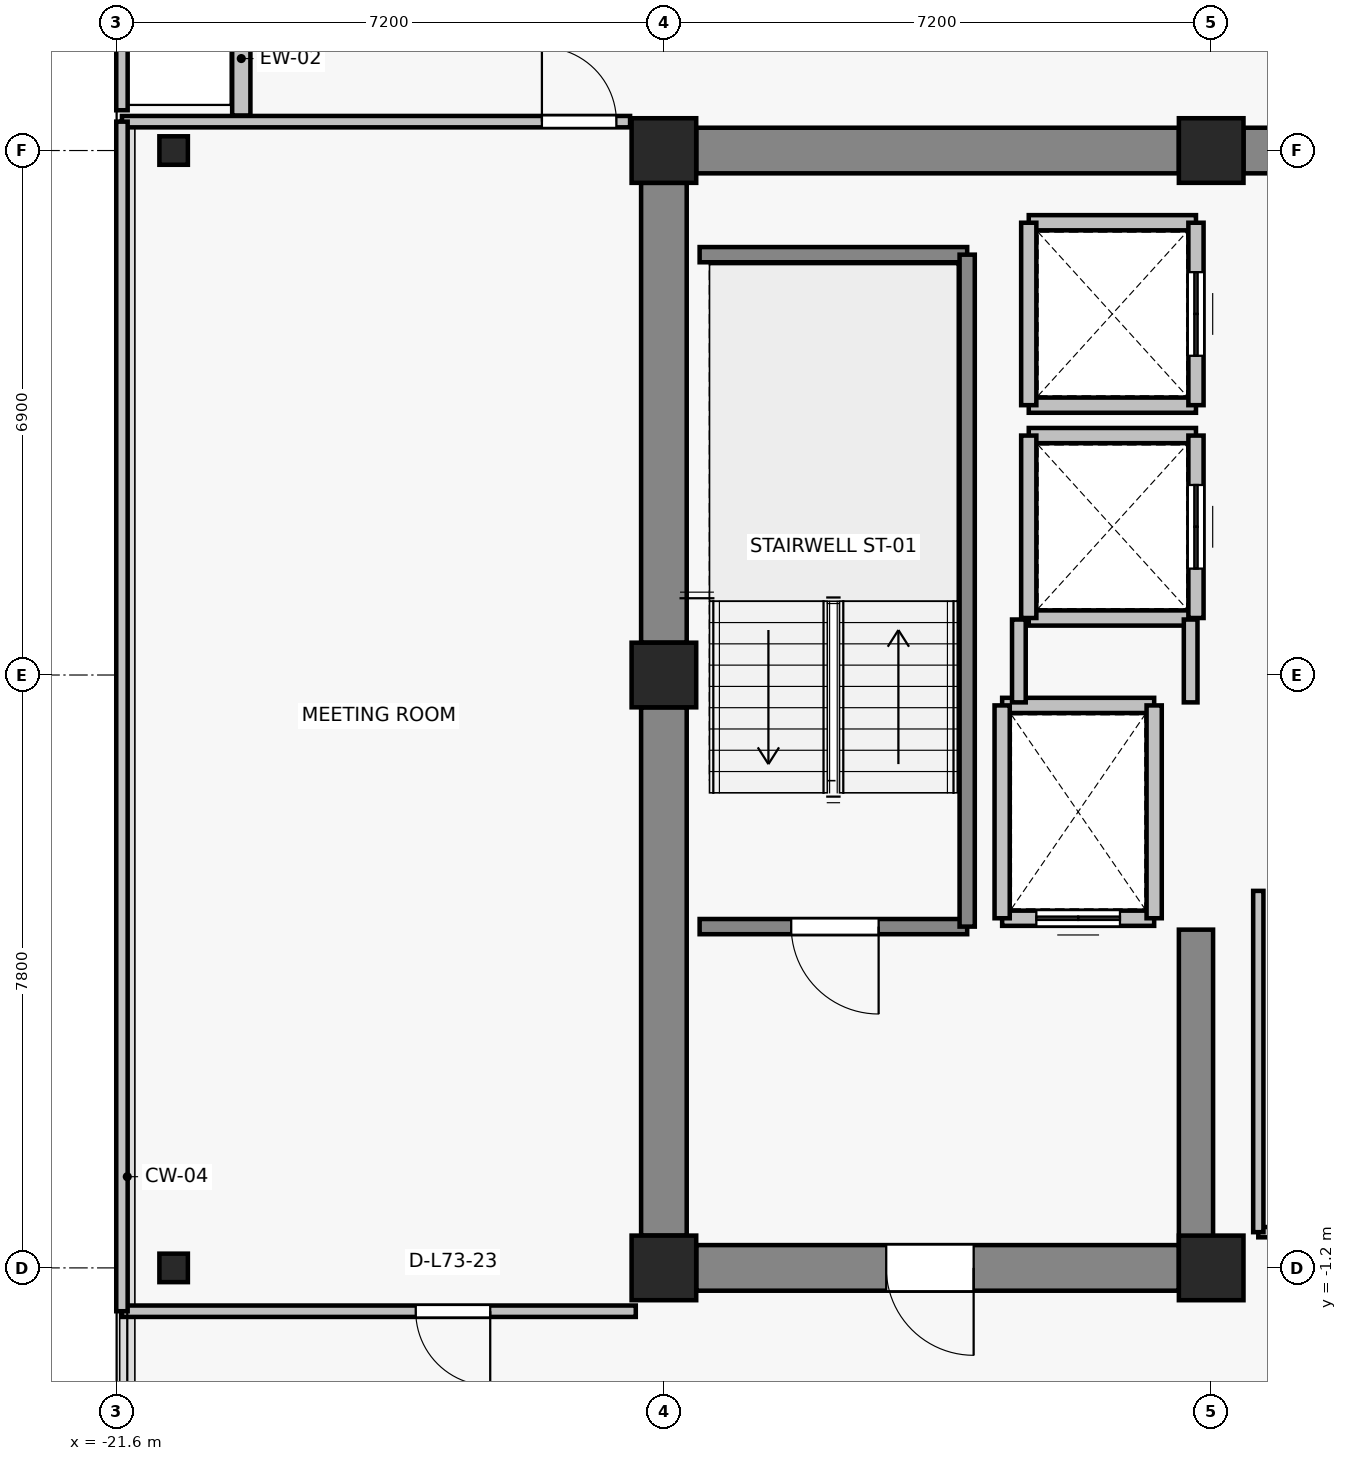
"""IFC4 building model, lengths in metres.
Left out: names, types, materials, properties, quantities, classifications, styles, units other than length and angle.
Written with IfcOpenShell. Run it as: python <this file> out.ifc"""

import sys

from ifc_helpers import new_model, si_unit, direction, frame, frame_2d, origin, origin_2d, place, context, subcontext, project, spatial, rectangle, i_section, extrude, source, transform, mapped, element, fill, save


model = new_model("IFC4")
c1 = context("Model", 3, precision=1e-05, world=origin(), true_north=direction((0.0, 1.0)))
c2 = subcontext(c1, "Body", "Model", "MODEL_VIEW")
j1 = project(units=[si_unit("LENGTHUNIT", "METRE"), si_unit("PLANEANGLEUNIT", "RADIAN")], contexts=[c1])
p1 = place(None, origin())
s1 = spatial("IfcSite", under=j1, at=p1, CompositionType="ELEMENT")
p2 = place(p1, origin())
s2 = spatial("IfcBuilding", under=s1, at=p2, CompositionType="ELEMENT")
p3 = place(p2, frame((0.0, 0.0, 258.4)))
s3 = spatial("IfcBuildingStorey", under=s2, at=p3, CompositionType="ELEMENT", Elevation=258.4)
for number, where, z_axis, x_axis in (
    (1, (-14.4, -1.2, 0.0), (0.0, 0.0, 1.0), (1.0, 0.0, 0.0)),
    (2, (-7.2, -1.2, 0.0), (0.0, 0.0, 1.0), (1.0, 0.0, 0.0)),
    (3, (-14.4, 6.6, 0.0), (0.0, 0.0, 1.0), (1.0, 0.0, 0.0)),
    (4, (-14.4, 13.5, 0.0), (0.0, 0.0, 1.0), (1.0, 0.0, 0.0)),
    (5, (-7.2, 13.5, 0.0), (0.0, 0.0, 1.0), (1.0, 0.0, 0.0)),
):
    element("IfcColumn", number, at=place(p3, frame(where, z_axis=z_axis, x_axis=x_axis)), inside=s3, PredefinedType="COLUMN", context=c2, shape_type="SweptSolid", body=[
        extrude(rectangle(XDim=0.85, YDim=0.85, at=origin_2d()), origin(), (0.0, 0.0, 1.0), 3.3),
    ])
for number, where, z_axis, x_axis in (
    (6, (-20.85, -1.2, 0.0), (0.0, 0.0, 1.0), (1.0, 0.0, 0.0)),
    (7, (-20.85, 13.5, 0.0), (0.0, 0.0, 1.0), (1.0, 0.0, 0.0)),
):
    element("IfcColumn", number, at=place(p3, frame(where, z_axis=z_axis, x_axis=x_axis)), inside=s3, PredefinedType="COLUMN", context=c2, shape_type="SweptSolid", body=[
        extrude(i_section(OverallWidth=0.375, OverallDepth=0.375, WebThickness=0.017, FlangeThickness=0.027, FilletRadius=0.015, at=origin_2d()), origin(), (0.0, 0.0, 1.0), 3.3),
    ])
p4 = place(p3, frame((-13.975, 13.5, 0.0), z_axis=(0.0, 0.0, 1.0), x_axis=(1.0, 0.0, 0.0)))
e8 = element("IfcWall", 8, at=p4, inside=s3, PredefinedType="SHEAR", context=c2, shape_type="SweptSolid", body=[
    extrude(rectangle(XDim=6.35, YDim=0.6, at=frame_2d((3.175, 0.0))), origin(), (0.0, 0.0, 1.0), 3.075),
])
p5 = place(p3, frame((-6.775, 13.5, 0.0), z_axis=(0.0, 0.0, 1.0), x_axis=(1.0, 0.0, 0.0)))
e9 = element("IfcWall", 9, at=p5, inside=s3, PredefinedType="SHEAR", context=c2, shape_type="SweptSolid", body=[
    extrude(rectangle(XDim=13.55, YDim=0.6, at=frame_2d((6.775, 0.0))), origin(), (0.0, 0.0, 1.0), 3.075),
])
p6 = place(p3, frame((-14.4, -0.775, 0.0), z_axis=(0.0, 0.0, 1.0), x_axis=(0.0, 1.0, 0.0)))
e10 = element("IfcWall", 10, at=p6, inside=s3, PredefinedType="SHEAR", context=c2, shape_type="SweptSolid", body=[
    extrude(rectangle(XDim=6.95, YDim=0.6, at=frame_2d((3.475, 0.0))), origin(), (0.0, 0.0, 1.0), 3.075),
])
p7 = place(p3, frame((-14.4, 7.025, 0.0), z_axis=(0.0, 0.0, 1.0), x_axis=(0.0, 1.0, 0.0)))
e11 = element("IfcWall", 11, at=p7, inside=s3, PredefinedType="SHEAR", context=c2, shape_type="SweptSolid", body=[
    extrude(rectangle(XDim=6.05, YDim=0.6, at=frame_2d((3.025, 0.0))), origin(), (0.0, 0.0, 1.0), 3.075),
])
p8 = place(p3, frame((-7.625, -1.2, 0.0), z_axis=(0.0, 0.0, 1.0), x_axis=(-1.0, 0.0, 0.0)))
e12 = element("IfcWall", 12, at=p8, inside=s3, PredefinedType="SHEAR", context=c2, shape_type="SweptSolid", body=[
    extrude(rectangle(XDim=6.35, YDim=0.6, at=frame_2d((3.175, 0.0))), origin(), (0.0, 0.0, 1.0), 3.075),
])
p9 = place(p8, frame((2.7, 0.0, 0.0)))
e13 = element("IfcOpeningElement", 13, at=p9, cuts=e12, PredefinedType="OPENING", context=c2, shape_type="SweptSolid", body=[
    extrude(rectangle(XDim=1.15, YDim=2.15, at=frame_2d((0.575, 1.075))), frame((0.0, 0.31, 0.0), z_axis=(0.0, -1.0, 0.0), x_axis=(1.0, 0.0, 0.0)), (0.0, 0.0, 1.0), 0.62),
])
p10 = place(p3, frame((-7.4, -0.9, 0.0), z_axis=(0.0, 0.0, 1.0), x_axis=(0.0, 1.0, 0.0)))
e14 = element("IfcWall", 14, at=p10, inside=s3, PredefinedType="SHEAR", context=c2, shape_type="SweptSolid", body=[
    extrude(rectangle(XDim=4.15, YDim=0.45, at=frame_2d((2.075, 0.0))), origin(), (0.0, 0.0, 1.0), 3.075),
])
p11 = place(p3, frame((-19.96, 15.46, 0.0), z_axis=(0.0, 0.0, 1.0), x_axis=(0.0, -1.0, 0.0)))
e15 = element("IfcWall", 15, at=p11, inside=s3, PredefinedType="SOLIDWALL", context=c2, shape_type="SweptSolid", body=[
    extrude(rectangle(XDim=1.5, YDim=0.24, at=frame_2d((0.75, 0.0))), origin(), (0.0, 0.0, 1.0), 3.075),
])
p12 = place(p3, frame((-7.95, 3.4, 0.0), z_axis=(0.0, 0.0, 1.0), x_axis=(-1.0, 0.0, 0.0)))
e16 = element("IfcWall", 16, at=p12, inside=s3, PredefinedType="SOLIDWALL", context=c2, shape_type="SweptSolid", body=[
    extrude(rectangle(XDim=2.0, YDim=0.2, at=frame_2d((1.0, 0.0))), origin(), (0.0, 0.0, 1.0), 3.075),
])
p13 = place(p12, frame((0.45, 0.0, 0.0)))
e17 = element("IfcOpeningElement", 17, at=p13, cuts=e16, PredefinedType="OPENING", context=c2, shape_type="SweptSolid", body=[
    extrude(rectangle(XDim=1.1, YDim=2.2, at=frame_2d((0.55, 1.1))), frame((0.0, 0.11, 0.0), z_axis=(0.0, -1.0, 0.0), x_axis=(1.0, 0.0, 0.0)), (0.0, 0.0, 1.0), 0.22),
])
p14 = place(p3, frame((-9.95, 6.2, 0.0), z_axis=(0.0, 0.0, 1.0), x_axis=(1.0, 0.0, 0.0)))
e18 = element("IfcWall", 18, at=p14, inside=s3, PredefinedType="SOLIDWALL", context=c2, shape_type="SweptSolid", body=[
    extrude(rectangle(XDim=2.0, YDim=0.2, at=frame_2d((1.0, 0.0))), origin(), (0.0, 0.0, 1.0), 3.075),
])
for number, where, z_axis, x_axis in (
    (19, (-9.95, 3.4, 0.0), (0.0, 0.0, 1.0), (0.0, 1.0, 0.0)),
    (20, (-7.95, 6.2, 0.0), (0.0, 0.0, 1.0), (0.0, -1.0, 0.0)),
):
    element("IfcWall", number, at=place(p3, frame(where, z_axis=z_axis, x_axis=x_axis)), inside=s3, PredefinedType="SOLIDWALL", context=c2, shape_type="SweptSolid", body=[
        extrude(rectangle(XDim=2.8, YDim=0.2, at=frame_2d((1.4, 0.0))), origin(), (0.0, 0.0, 1.0), 3.075),
    ])
for number, where, z_axis, x_axis in (
    (21, (-7.4, 7.35, 0.0), (0.0, 0.0, 1.0), (-1.0, 0.0, 0.0)),
    (22, (-9.6, 9.75, 0.0), (0.0, 0.0, 1.0), (1.0, 0.0, 0.0)),
):
    element("IfcWall", number, at=place(p3, frame(where, z_axis=z_axis, x_axis=x_axis)), inside=s3, PredefinedType="SOLIDWALL", context=c2, shape_type="SweptSolid", body=[
        extrude(rectangle(XDim=2.2, YDim=0.2, at=frame_2d((1.1, 0.0))), origin(), (0.0, 0.0, 1.0), 2.615),
    ])
p15 = place(p3, frame((-9.6, 7.35, 0.0), z_axis=(0.0, 0.0, 1.0), x_axis=(0.0, 1.0, 0.0)))
e23 = element("IfcWall", 23, at=p15, inside=s3, PredefinedType="SOLIDWALL", context=c2, shape_type="SweptSolid", body=[
    extrude(rectangle(XDim=2.4, YDim=0.2, at=frame_2d((1.2, 0.0))), origin(), (0.0, 0.0, 1.0), 3.075),
])
p16 = place(p3, frame((-7.4, 9.75, 0.0), z_axis=(0.0, 0.0, 1.0), x_axis=(0.0, -1.0, 0.0)))
e24 = element("IfcWall", 24, at=p16, inside=s3, PredefinedType="SOLIDWALL", context=c2, shape_type="SweptSolid", body=[
    extrude(rectangle(XDim=2.4, YDim=0.2, at=frame_2d((1.2, 0.0))), origin(), (0.0, 0.0, 1.0), 2.615),
])
p17 = place(p16, frame((0.65, 0.0, 0.0)))
e25 = element("IfcOpeningElement", 25, at=p17, cuts=e24, PredefinedType="OPENING", context=c2, shape_type="SweptSolid", body=[
    extrude(rectangle(XDim=1.1, YDim=2.2, at=frame_2d((0.55, 1.1))), frame((0.0, 0.11, 0.0), z_axis=(0.0, -1.0, 0.0), x_axis=(1.0, 0.0, 0.0)), (0.0, 0.0, 1.0), 0.22),
])
for number, where, z_axis, x_axis in (
    (26, (-7.4, 10.15, 0.0), (0.0, 0.0, 1.0), (-1.0, 0.0, 0.0)),
    (27, (-9.6, 12.55, 0.0), (0.0, 0.0, 1.0), (1.0, 0.0, 0.0)),
):
    element("IfcWall", number, at=place(p3, frame(where, z_axis=z_axis, x_axis=x_axis)), inside=s3, PredefinedType="SOLIDWALL", context=c2, shape_type="SweptSolid", body=[
        extrude(rectangle(XDim=2.2, YDim=0.2, at=frame_2d((1.1, 0.0))), origin(), (0.0, 0.0, 1.0), 2.615),
    ])
p18 = place(p3, frame((-9.6, 10.15, 0.0), z_axis=(0.0, 0.0, 1.0), x_axis=(0.0, 1.0, 0.0)))
e28 = element("IfcWall", 28, at=p18, inside=s3, PredefinedType="SOLIDWALL", context=c2, shape_type="SweptSolid", body=[
    extrude(rectangle(XDim=2.4, YDim=0.2, at=frame_2d((1.2, 0.0))), origin(), (0.0, 0.0, 1.0), 3.075),
])
p19 = place(p3, frame((-7.4, 12.55, 0.0), z_axis=(0.0, 0.0, 1.0), x_axis=(0.0, -1.0, 0.0)))
e29 = element("IfcWall", 29, at=p19, inside=s3, PredefinedType="SOLIDWALL", context=c2, shape_type="SweptSolid", body=[
    extrude(rectangle(XDim=2.4, YDim=0.2, at=frame_2d((1.2, 0.0))), origin(), (0.0, 0.0, 1.0), 2.615),
])
p20 = place(p19, frame((0.65, 0.0, 0.0)))
e30 = element("IfcOpeningElement", 30, at=p20, cuts=e29, PredefinedType="OPENING", context=c2, shape_type="SweptSolid", body=[
    extrude(rectangle(XDim=1.1, YDim=2.2, at=frame_2d((0.55, 1.1))), frame((0.0, 0.11, 0.0), z_axis=(0.0, -1.0, 0.0), x_axis=(1.0, 0.0, 0.0)), (0.0, 0.0, 1.0), 0.22),
])
p21 = place(p3, frame((-10.41, 3.29, 0.0), z_axis=(0.0, 0.0, 1.0), x_axis=(-1.0, 0.0, 0.0)))
e31 = element("IfcWall", 31, at=p21, inside=s3, PredefinedType="SOLIDWALL", context=c2, shape_type="SweptSolid", body=[
    extrude(rectangle(XDim=3.52, YDim=0.2, at=frame_2d((1.76, 0.0))), origin(), (0.0, 0.0, 1.0), 3.075),
])
p22 = place(p21, frame((1.165, 0.0, 0.0)))
e32 = element("IfcOpeningElement", 32, at=p22, cuts=e31, PredefinedType="OPENING", context=c2, shape_type="SweptSolid", body=[
    extrude(rectangle(XDim=1.15, YDim=2.15, at=frame_2d((0.575, 1.075))), frame((0.0, 0.11, 0.0), z_axis=(0.0, -1.0, 0.0), x_axis=(1.0, 0.0, 0.0)), (0.0, 0.0, 1.0), 0.22),
])
p23 = place(p3, frame((-13.93, 12.13, 0.0), z_axis=(0.0, 0.0, 1.0), x_axis=(1.0, 0.0, 0.0)))
e33 = element("IfcWall", 33, at=p23, inside=s3, PredefinedType="SOLIDWALL", context=c2, shape_type="SweptSolid", body=[
    extrude(rectangle(XDim=3.52, YDim=0.2, at=frame_2d((1.76, 0.0))), origin(), (0.0, 0.0, 1.0), 3.075),
])
p24 = place(p3, frame((-10.41, 12.13, 0.0), z_axis=(0.0, 0.0, 1.0), x_axis=(0.0, -1.0, 0.0)))
e34 = element("IfcWall", 34, at=p24, inside=s3, PredefinedType="SOLIDWALL", context=c2, shape_type="SweptSolid", body=[
    extrude(rectangle(XDim=8.84, YDim=0.2, at=frame_2d((4.42, 0.0))), origin(), (0.0, 0.0, 1.0), 3.075),
])
p25 = place(p3, frame((-9.73, 6.24, 0.0), z_axis=(0.0, 0.0, 1.0), x_axis=(0.0, 1.0, 0.0)))
e35 = element("IfcWall", 35, at=p25, inside=s3, PredefinedType="PARTITIONING", context=c2, shape_type="SweptSolid", body=[
    extrude(rectangle(XDim=1.09, YDim=0.18, at=frame_2d((0.545, 0.0))), origin(), (0.0, 0.0, 1.0), 3.075),
])
p26 = place(p3, frame((-7.47, 7.33, 0.0), z_axis=(0.0, 0.0, 1.0), x_axis=(0.0, -1.0, 0.0)))
e36 = element("IfcWall", 36, at=p26, inside=s3, PredefinedType="PARTITIONING", context=c2, shape_type="SweptSolid", body=[
    extrude(rectangle(XDim=1.09, YDim=0.18, at=frame_2d((0.545, 0.0))), origin(), (0.0, 0.0, 1.0), 2.615),
])
p27 = place(p3, frame((-3.47, -0.73, 0.0), z_axis=(0.0, 0.0, 1.0), x_axis=(-1.0, 0.0, 0.0)))
e37 = element("IfcWall", 37, at=p27, inside=s3, PredefinedType="PARTITIONING", context=c2, shape_type="SweptSolid", body=[
    extrude(rectangle(XDim=3.11, YDim=0.135, at=frame_2d((1.555, 0.0))), origin(), (0.0, 0.0, 1.0), 3.075),
])
p28 = place(p27, frame((1.09, 0.0, 0.0)))
e38 = element("IfcOpeningElement", 38, at=p28, cuts=e37, PredefinedType="OPENING", context=c2, shape_type="SweptSolid", body=[
    extrude(rectangle(XDim=0.92, YDim=2.1, at=frame_2d((0.46, 1.05))), frame((0.0, 0.077, 0.0), z_axis=(0.0, -1.0, 0.0), x_axis=(1.0, 0.0, 0.0)), (0.0, 0.0, 1.0), 0.155),
])
p29 = place(p3, frame((-6.58, -0.73, 0.0), z_axis=(0.0, 0.0, 1.0), x_axis=(0.0, 1.0, 0.0)))
e39 = element("IfcWall", 39, at=p29, inside=s3, PredefinedType="PARTITIONING", context=c2, shape_type="SweptSolid", body=[
    extrude(rectangle(XDim=4.49, YDim=0.135, at=frame_2d((2.245, 0.0))), origin(), (0.0, 0.0, 1.0), 3.075),
])
p30 = place(p3, frame((-14.77, -1.77, 0.0), z_axis=(0.0, 0.0, 1.0), x_axis=(-1.0, 0.0, 0.0)))
e40 = element("IfcWall", 40, at=p30, inside=s3, PredefinedType="PARTITIONING", context=c2, shape_type="SweptSolid", body=[
    extrude(rectangle(XDim=6.76, YDim=0.15, at=frame_2d((3.38, 0.0))), origin(), (0.0, 0.0, 1.0), 2.765),
])
p31 = place(p30, frame((1.915, 0.0, 0.0)))
e41 = element("IfcOpeningElement", 41, at=p31, cuts=e40, PredefinedType="OPENING", context=c2, shape_type="SweptSolid", body=[
    extrude(rectangle(XDim=0.98, YDim=2.15, at=frame_2d((0.49, 1.075))), frame((0.0, 0.085, 0.0), z_axis=(0.0, -1.0, 0.0), x_axis=(1.0, 0.0, 0.0)), (0.0, 0.0, 1.0), 0.17),
])
p32 = place(p3, frame((-21.53, 13.88, 0.0), z_axis=(0.0, 0.0, 1.0), x_axis=(1.0, 0.0, 0.0)))
e42 = element("IfcWall", 42, at=p32, inside=s3, PredefinedType="PARTITIONING", context=c2, shape_type="SweptSolid", body=[
    extrude(rectangle(XDim=6.685, YDim=0.15, at=frame_2d((3.343, 0.0))), origin(), (0.0, 0.0, 1.0), 3.075),
])
p33 = place(p32, frame((5.525, 0.0, 0.0)))
e43 = element("IfcOpeningElement", 43, at=p33, cuts=e42, PredefinedType="OPENING", context=c2, shape_type="SweptSolid", body=[
    extrude(rectangle(XDim=0.98, YDim=2.15, at=frame_2d((0.49, 1.075))), frame((0.0, 0.085, 0.0), z_axis=(0.0, -1.0, 0.0), x_axis=(1.0, 0.0, 0.0)), (0.0, 0.0, 1.0), 0.17),
])
p34 = place(p3, frame((-21.53, -1.77, 0.0), z_axis=(0.0, 0.0, 1.0), x_axis=(0.0, 1.0, 0.0)))
e44 = element("IfcWall", 44, at=p34, inside=s3, PredefinedType="PARTITIONING", context=c2, shape_type="SweptSolid", body=[
    extrude(rectangle(XDim=15.65, YDim=0.15, at=frame_2d((7.825, 0.0))), origin(), (0.0, 0.0, 1.0), 3.075),
])
p35 = place(p3, frame((-21.53, 14.03, 0.0), z_axis=(0.0, 0.0, 1.0), x_axis=(0.0, 1.0, 0.0)))
e45 = element("IfcWall", 45, at=p35, inside=s3, PredefinedType="PARTITIONING", context=c2, shape_type="SweptSolid", body=[
    extrude(rectangle(XDim=3.0, YDim=0.15, at=frame_2d((1.5, 0.0))), origin(), (0.0, 0.0, 1.0), 3.075),
])
m1 = source(origin(), c2, "Body", "SweptSolid", [
    extrude(rectangle(XDim=1.1, YDim=2.2, at=frame_2d((0.55, 1.1))), frame((0.0, 0.025, 0.0), z_axis=(0.0, -1.0, 0.0), x_axis=(1.0, 0.0, 0.0)), (0.0, 0.0, 1.0), 0.05),
])
p36 = place(p13, origin())
e46 = element("IfcDoor", 46, at=p36, inside=s3, OperationType="DOUBLE_DOOR_SLIDING", PredefinedType="DOOR", context=c2, shape_type="MappedRepresentation", body=[
    mapped(m1, transform((0.0, 0.0, 0.0), x_axis=(1.0, 0.0, 0.0), y_axis=(0.0, 1.0, 0.0), z_axis=(0.0, 0.0, 1.0), scale=1.0)),
])
fill(e17, e46)
p37 = place(p17, origin())
e47 = element("IfcDoor", 47, at=p37, inside=s3, OperationType="DOUBLE_DOOR_SLIDING", PredefinedType="DOOR", context=c2, shape_type="MappedRepresentation", body=[
    mapped(m1, transform((0.0, 0.0, 0.0), x_axis=(1.0, 0.0, 0.0), y_axis=(0.0, 1.0, 0.0), z_axis=(0.0, 0.0, 1.0), scale=1.0)),
])
fill(e25, e47)
p38 = place(p20, origin())
e48 = element("IfcDoor", 48, at=p38, inside=s3, OperationType="DOUBLE_DOOR_SLIDING", PredefinedType="DOOR", context=c2, shape_type="MappedRepresentation", body=[
    mapped(m1, transform((0.0, 0.0, 0.0), x_axis=(1.0, 0.0, 0.0), y_axis=(0.0, 1.0, 0.0), z_axis=(0.0, 0.0, 1.0), scale=1.0)),
])
fill(e30, e48)
m2 = source(origin(), c2, "Body", "SweptSolid", [
    extrude(rectangle(XDim=1.15, YDim=2.15, at=frame_2d((0.575, 1.075))), frame((0.0, 0.025, 0.0), z_axis=(0.0, -1.0, 0.0), x_axis=(1.0, 0.0, 0.0)), (0.0, 0.0, 1.0), 0.05),
])
p39 = place(p22, origin())
e49 = element("IfcDoor", 49, at=p39, inside=s3, OperationType="SINGLE_SWING_LEFT", PredefinedType="DOOR", context=c2, shape_type="MappedRepresentation", body=[
    mapped(m2, transform((0.0, 0.0, 0.0), x_axis=(1.0, 0.0, 0.0), y_axis=(0.0, 1.0, 0.0), z_axis=(0.0, 0.0, 1.0), scale=1.0)),
])
fill(e32, e49)
p40 = place(p9, origin())
e50 = element("IfcDoor", 50, at=p40, inside=s3, OperationType="SINGLE_SWING_LEFT", PredefinedType="DOOR", context=c2, shape_type="MappedRepresentation", body=[
    mapped(m2, transform((0.0, 0.0, 0.0), x_axis=(1.0, 0.0, 0.0), y_axis=(0.0, 1.0, 0.0), z_axis=(0.0, 0.0, 1.0), scale=1.0)),
])
fill(e13, e50)
m3 = source(origin(), c2, "Body", "SweptSolid", [
    extrude(rectangle(XDim=0.98, YDim=2.15, at=frame_2d((0.49, 1.075))), frame((0.0, 0.025, 0.0), z_axis=(0.0, -1.0, 0.0), x_axis=(1.0, 0.0, 0.0)), (0.0, 0.0, 1.0), 0.05),
])
p41 = place(p31, origin())
e51 = element("IfcDoor", 51, at=p41, inside=s3, OperationType="SINGLE_SWING_LEFT", PredefinedType="DOOR", context=c2, shape_type="MappedRepresentation", body=[
    mapped(m3, transform((0.0, 0.0, 0.0), x_axis=(1.0, 0.0, 0.0), y_axis=(0.0, 1.0, 0.0), z_axis=(0.0, 0.0, 1.0), scale=1.0)),
])
fill(e41, e51)
p42 = place(p33, origin())
e52 = element("IfcDoor", 52, at=p42, inside=s3, OperationType="SINGLE_SWING_LEFT", PredefinedType="DOOR", context=c2, shape_type="MappedRepresentation", body=[
    mapped(m3, transform((0.0, 0.0, 0.0), x_axis=(1.0, 0.0, 0.0), y_axis=(0.0, 1.0, 0.0), z_axis=(0.0, 0.0, 1.0), scale=1.0)),
])
fill(e43, e52)
save(model, sys.argv[1])
